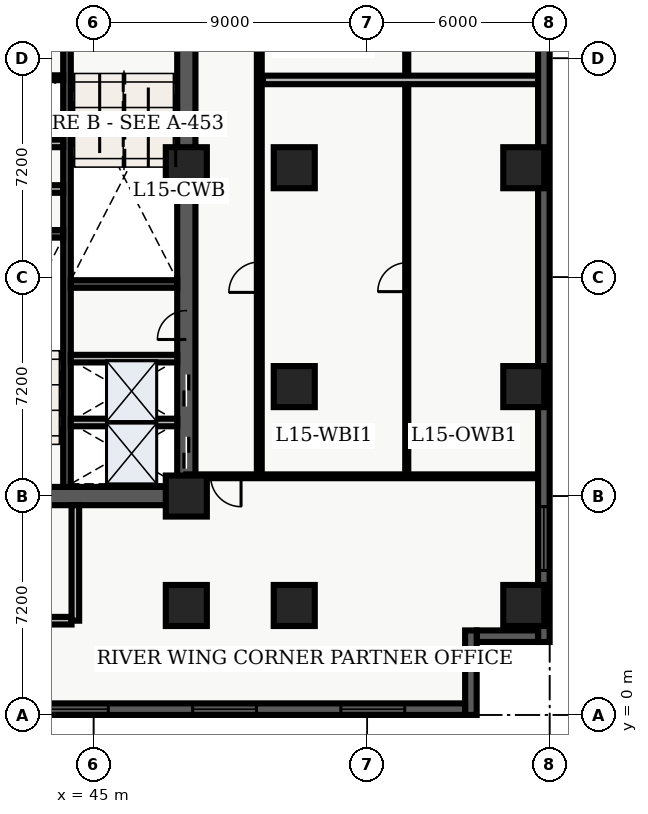
"""IFC4 building model, lengths in metres.
Left out: names, types, materials, properties, quantities, classifications, styles, units other than length and angle.
Written with IfcOpenShell. Run it as: python <this file> out.ifc"""

import sys

from ifc_helpers import new_model, entity, si_unit, converted_unit, direction, frame, origin_with_axes, origin_2d_with_axis, place, context, subcontext, project, spatial, polyline, rectangle, outline, extrude, element, fill, save


model = new_model("IFC4")
c1 = context("Model", 3, precision=1e-05, world=origin_with_axes(), true_north=direction((0.0, 1.0)))
c2 = subcontext(c1, "Body", "Model", "MODEL_VIEW")
j1 = project(units=[si_unit("LENGTHUNIT", "METRE"), converted_unit("PLANEANGLEUNIT", "DEGREE", entity("IfcPlaneAngleMeasure", 0.017), si_unit("PLANEANGLEUNIT", "RADIAN"), dimensions=[0, 0, 0, 0, 0, 0, 0])], contexts=[c1])
p1 = place(None, origin_with_axes())
s1 = spatial("IfcSite", under=j1, at=p1, CompositionType="ELEMENT")
p2 = place(p1, origin_with_axes())
s2 = spatial("IfcBuilding", under=s1, at=p2, CompositionType="ELEMENT")
p3 = place(p2, frame((0.0, 0.0, 63.9), z_axis=(0.0, 0.0, 1.0), x_axis=(1.0, 0.0, 0.0)))
s3 = spatial("IfcBuildingStorey", under=s2, at=p3, CompositionType="ELEMENT", Elevation=63.9)
p4 = place(p3, frame((40.2, 7.2, 0.0), z_axis=(0.0, 0.0, 1.0), x_axis=(1.0, 0.0, 0.0)))
e1 = element("IfcWall", 1, at=p4, inside=s3, PredefinedType="SHEAR", context=c2, shape_type="SweptSolid", body=[
    extrude(outline(polyline([(0.0, -0.3), (7.85, -0.3), (7.85, 0.3), (0.0, 0.3), (0.0, -0.3)])), origin_with_axes(), (0.0, 0.0, 1.0), 3.66),
])
p5 = place(p4, frame((2.175, 0.0, 0.0), z_axis=(0.0, 0.0, 1.0), x_axis=(1.0, 0.0, 0.0)))
e2 = element("IfcOpeningElement", 2, at=p5, cuts=e1, PredefinedType="OPENING", context=c2, shape_type="SweptSolid", body=[
    extrude(rectangle(XDim=1.05, YDim=0.62, at=origin_2d_with_axis()), origin_with_axes(), (0.0, 0.0, 1.0), 2.15),
])
p6 = place(p3, frame((48.05, 7.2, 0.0), z_axis=(0.0, 0.0, 1.0), x_axis=(0.0, 1.0, 0.0)))
e3 = element("IfcWall", 3, at=p6, inside=s3, PredefinedType="SHEAR", context=c2, shape_type="SweptSolid", body=[
    extrude(outline(polyline([(0.0, -0.3), (15.6, -0.3), (15.6, 0.3), (0.0, 0.3), (0.0, -0.3)])), origin_with_axes(), (0.0, 0.0, 1.0), 3.66),
])
p7 = place(p6, frame((1.425, 0.0, 0.0), z_axis=(0.0, 0.0, 1.0), x_axis=(1.0, 0.0, 0.0)))
e4 = element("IfcOpeningElement", 4, at=p7, cuts=e3, PredefinedType="OPENING", context=c2, shape_type="SweptSolid", body=[
    extrude(rectangle(XDim=1.05, YDim=0.62, at=origin_2d_with_axis()), origin_with_axes(), (0.0, 0.0, 1.0), 2.15),
])
p8 = place(p6, frame((3.475, 0.0, 0.0), z_axis=(0.0, 0.0, 1.0), x_axis=(1.0, 0.0, 0.0)))
e5 = element("IfcOpeningElement", 5, at=p8, cuts=e3, PredefinedType="OPENING", context=c2, shape_type="SweptSolid", body=[
    extrude(rectangle(XDim=1.05, YDim=0.62, at=origin_2d_with_axis()), origin_with_axes(), (0.0, 0.0, 1.0), 2.15),
])
p9 = place(p6, frame((5.625, 0.0, 0.0), z_axis=(0.0, 0.0, 1.0), x_axis=(1.0, 0.0, 0.0)))
e6 = element("IfcOpeningElement", 6, at=p9, cuts=e3, PredefinedType="OPENING", context=c2, shape_type="SweptSolid", body=[
    extrude(rectangle(XDim=0.95, YDim=0.62, at=origin_2d_with_axis()), origin_with_axes(), (0.0, 0.0, 1.0), 2.15),
])
p10 = place(p3, frame((44.125, 7.5, 0.0), z_axis=(0.0, 0.0, 1.0), x_axis=(0.0, 1.0, 0.0)))
e7 = element("IfcWall", 7, at=p10, inside=s3, PredefinedType="SHEAR", context=c2, shape_type="SweptSolid", body=[
    extrude(outline(polyline([(0.0, -0.125), (15.0, -0.125), (15.0, 0.125), (0.0, 0.125), (0.0, -0.125)])), origin_with_axes(), (0.0, 0.0, 1.0), 3.66),
])
for number, where, z_axis, x_axis in (
    (8, (40.5, 15.825, 0.0), (0.0, 0.0, 1.0), (1.0, 0.0, 0.0)),
    (9, (44.25, 14.175, 0.0), (0.0, 0.0, 1.0), (1.0, 0.0, 0.0)),
):
    element("IfcWall", number, at=place(p3, frame(where, z_axis=z_axis, x_axis=x_axis)), inside=s3, PredefinedType="SHEAR", context=c2, shape_type="SweptSolid", body=[
        extrude(outline(polyline([(0.0, -0.125), (3.5, -0.125), (3.5, 0.125), (0.0, 0.125), (0.0, -0.125)])), origin_with_axes(), (0.0, 0.0, 1.0), 3.66),
    ])
p11 = place(p3, frame((40.5, 17.3, 0.0), z_axis=(0.0, 0.0, 1.0), x_axis=(1.0, 0.0, 0.0)))
e10 = element("IfcWall", 10, at=p11, inside=s3, PredefinedType="SOLIDWALL", context=c2, shape_type="SweptSolid", body=[
    extrude(outline(polyline([(0.0, -0.125), (3.5, -0.125), (3.5, 0.125), (0.0, 0.125), (0.0, -0.125)])), origin_with_axes(), (0.0, 0.0, 1.0), 2.7),
])
p12 = place(p11, frame((2.4, 0.0, 0.0), z_axis=(0.0, 0.0, 1.0), x_axis=(1.0, 0.0, 0.0)))
e11 = element("IfcOpeningElement", 11, at=p12, cuts=e10, PredefinedType="OPENING", context=c2, shape_type="SweptSolid", body=[
    extrude(rectangle(XDim=0.9, YDim=0.27, at=origin_2d_with_axis()), origin_with_axes(), (0.0, 0.0, 1.0), 2.15),
])
p13 = place(p3, frame((40.5, 18.8, 0.0), z_axis=(0.0, 0.0, 1.0), x_axis=(1.0, 0.0, 0.0)))
e12 = element("IfcWall", 12, at=p13, inside=s3, PredefinedType="SOLIDWALL", context=c2, shape_type="SweptSolid", body=[
    extrude(outline(polyline([(0.0, -0.125), (3.5, -0.125), (3.5, 0.125), (0.0, 0.125), (0.0, -0.125)])), origin_with_axes(), (0.0, 0.0, 1.0), 2.7),
])
p14 = place(p3, frame((40.325, 3.1, 0.0), z_axis=(0.0, 0.0, 1.0), x_axis=(1.0, 0.0, 0.0)))
e13 = element("IfcWall", 13, at=p14, inside=s3, PredefinedType="SOLIDWALL", context=c2, shape_type="SweptSolid", body=[
    extrude(outline(polyline([(0.0, -0.125), (3.95, -0.125), (3.95, 0.125), (0.0, 0.125), (0.0, -0.125)])), origin_with_axes(), (0.0, 0.0, 1.0), 2.7),
])
p15 = place(p3, frame((44.4, 3.1, 0.0), z_axis=(0.0, 0.0, 1.0), x_axis=(0.0, 1.0, 0.0)))
e14 = element("IfcWall", 14, at=p15, inside=s3, PredefinedType="SOLIDWALL", context=c2, shape_type="SweptSolid", body=[
    extrude(outline(polyline([(0.0, -0.125), (3.8, -0.125), (3.8, 0.125), (0.0, 0.125), (0.0, -0.125)])), origin_with_axes(), (0.0, 0.0, 1.0), 2.7),
])
for number, where, z_axis, x_axis in (
    (15, (48.05, 3.6, 0.0), (0.0, 0.0, 1.0), (1.0, 0.0, 0.0)),
    (16, (48.05, 7.2, 0.0), (0.0, 0.0, 1.0), (1.0, 0.0, 0.0)),
    (17, (48.05, 18.0, 0.0), (0.0, 0.0, 1.0), (1.0, 0.0, 0.0)),
    (18, (51.6, 3.6, 0.0), (0.0, 0.0, 1.0), (1.0, 0.0, 0.0)),
    (19, (51.6, 10.8, 0.0), (0.0, 0.0, 1.0), (1.0, 0.0, 0.0)),
    (20, (51.6, 18.0, 0.0), (0.0, 0.0, 1.0), (1.0, 0.0, 0.0)),
    (21, (59.15, 3.6, 0.0), (0.0, 0.0, 1.0), (1.0, 0.0, 0.0)),
    (22, (59.15, 10.8, 0.0), (0.0, 0.0, 1.0), (1.0, 0.0, 0.0)),
    (23, (59.15, 18.0, 0.0), (0.0, 0.0, 1.0), (1.0, 0.0, 0.0)),
):
    element("IfcColumn", number, at=place(p3, frame(where, z_axis=z_axis, x_axis=x_axis)), inside=s3, PredefinedType="COLUMN", context=c2, shape_type="SweptSolid", body=[
        extrude(rectangle(XDim=1.35, YDim=1.35, at=origin_2d_with_axis()), origin_with_axes(), (0.0, 0.0, 1.0), 3.9),
    ])
p16 = place(p3, frame((40.5, 20.96, 0.0), z_axis=(0.0, 0.0, 1.0), x_axis=(1.0, 0.0, 0.0)))
e24 = element("IfcWall", 24, at=p16, inside=s3, PredefinedType="PARTITIONING", context=c2, shape_type="SweptSolid", body=[
    extrude(outline(polyline([(0.0, -0.08), (3.5, -0.08), (3.5, 0.08), (0.0, 0.08), (0.0, -0.08)])), origin_with_axes(), (0.0, 0.0, 1.0), 2.7),
])
for number, where, z_axis, x_axis in (
    (25, (44.25, 9.62, 0.0), (0.0, 0.0, 1.0), (1.0, 0.0, 0.0)),
    (26, (44.25, 11.72, 0.0), (0.0, 0.0, 1.0), (1.0, 0.0, 0.0)),
):
    element("IfcWall", number, at=place(p3, frame(where, z_axis=z_axis, x_axis=x_axis)), inside=s3, PredefinedType="SOLIDWALL", context=c2, shape_type="SweptSolid", body=[
        extrude(outline(polyline([(0.0, -0.125), (3.5, -0.125), (3.5, 0.125), (0.0, 0.125), (0.0, -0.125)])), origin_with_axes(), (0.0, 0.0, 1.0), 2.7),
    ])
p17 = place(p3, frame((50.45, 7.85, 0.0), z_axis=(0.0, 0.0, 1.0), x_axis=(0.0, 1.0, 0.0)))
e27 = element("IfcWall", 27, at=p17, inside=s3, PredefinedType="PARTITIONING", context=c2, shape_type="SweptSolid", body=[
    extrude(outline(polyline([(0.0, -0.08), (18.8, -0.08), (18.8, 0.08), (0.0, 0.08), (0.0, -0.08)])), origin_with_axes(), (0.0, 0.0, 1.0), 2.7),
])
p18 = place(p17, frame((6.549, 0.0, 0.0), z_axis=(0.0, 0.0, 1.0), x_axis=(1.0, 0.0, 0.0)))
e28 = element("IfcOpeningElement", 28, at=p18, cuts=e27, PredefinedType="OPENING", context=c2, shape_type="SweptSolid", body=[
    extrude(rectangle(XDim=1.0, YDim=0.18, at=origin_2d_with_axis()), origin_with_axes(), (0.0, 0.0, 1.0), 2.15),
])
p19 = place(p17, frame((18.039, 0.0, 0.0), z_axis=(0.0, 0.0, 1.0), x_axis=(1.0, 0.0, 0.0)))
e29 = element("IfcOpeningElement", 29, at=p19, cuts=e27, PredefinedType="OPENING", context=c2, shape_type="SweptSolid", body=[
    extrude(rectangle(XDim=1.0, YDim=0.18, at=origin_2d_with_axis()), origin_with_axes(), (0.0, 0.0, 1.0), 2.15),
])
p20 = place(p3, frame((59.64, 7.85, 0.0), z_axis=(0.0, 0.0, 1.0), x_axis=(-1.0, 0.0, 0.0)))
e30 = element("IfcWall", 30, at=p20, inside=s3, PredefinedType="PARTITIONING", context=c2, shape_type="SweptSolid", body=[
    extrude(outline(polyline([(0.0, -0.062), (11.59, -0.062), (11.59, 0.062), (0.0, 0.062), (0.0, -0.062)])), origin_with_axes(), (0.0, 0.0, 1.0), 2.7),
])
p21 = place(p20, frame((10.29, 0.0, 0.0), z_axis=(0.0, 0.0, 1.0), x_axis=(1.0, 0.0, 0.0)))
e31 = element("IfcOpeningElement", 31, at=p21, cuts=e30, PredefinedType="OPENING", context=c2, shape_type="SweptSolid", body=[
    extrude(rectangle(XDim=1.0, YDim=0.145, at=origin_2d_with_axis()), origin_with_axes(), (0.0, 0.0, 1.0), 2.15),
])
p22 = place(p3, frame((55.3, 7.98, 0.0), z_axis=(0.0, 0.0, 1.0), x_axis=(0.0, 1.0, 0.0)))
e32 = element("IfcWall", 32, at=p22, inside=s3, PredefinedType="PARTITIONING", context=c2, shape_type="SweptSolid", body=[
    extrude(outline(polyline([(0.0, -0.05), (18.54, -0.05), (18.54, 0.05), (0.0, 0.05), (0.0, -0.05)])), origin_with_axes(), (0.0, 0.0, 1.0), 2.7),
])
p23 = place(p22, frame((6.419, 0.0, 0.0), z_axis=(0.0, 0.0, 1.0), x_axis=(1.0, 0.0, 0.0)))
e33 = element("IfcOpeningElement", 33, at=p23, cuts=e32, PredefinedType="OPENING", context=c2, shape_type="SweptSolid", body=[
    extrude(rectangle(XDim=0.95, YDim=0.12, at=origin_2d_with_axis()), origin_with_axes(), (0.0, 0.0, 1.0), 2.15),
])
p24 = place(p22, frame((15.759, 0.0, 0.0), z_axis=(0.0, 0.0, 1.0), x_axis=(1.0, 0.0, 0.0)))
e34 = element("IfcOpeningElement", 34, at=p24, cuts=e32, PredefinedType="OPENING", context=c2, shape_type="SweptSolid", body=[
    extrude(rectangle(XDim=0.95, YDim=0.12, at=origin_2d_with_axis()), origin_with_axes(), (0.0, 0.0, 1.0), 2.15),
])
p25 = place(p3, frame((50.57, 20.888, 0.0), z_axis=(0.0, 0.0, 1.0), x_axis=(1.0, 0.0, 0.0)))
e35 = element("IfcWall", 35, at=p25, inside=s3, PredefinedType="PARTITIONING", context=c2, shape_type="SweptSolid", body=[
    extrude(outline(polyline([(0.0, -0.14), (9.055, -0.14), (9.055, 0.14), (0.0, 0.14), (0.0, -0.14)])), origin_with_axes(), (0.0, 0.0, 1.0), 2.7),
])
p26 = place(p3, frame((59.81, 26.02, 0.0), z_axis=(0.0, 0.0, 1.0), x_axis=(0.0, -1.0, 0.0)))
e36 = element("IfcWall", 36, at=p26, inside=s3, PredefinedType="SOLIDWALL", context=c2, shape_type="SweptSolid", body=[
    extrude(outline(polyline([(0.0, -0.19), (23.62, -0.19), (23.62, 0.19), (0.0, 0.19), (0.0, -0.19)])), origin_with_axes(), (0.0, 0.0, 1.0), 3.66),
])
p27 = place(p26, frame((20.218, 0.0, 0.45), z_axis=(0.0, 0.0, 1.0), x_axis=(1.0, 0.0, 0.0)))
e37 = element("IfcOpeningElement", 37, at=p27, cuts=e36, PredefinedType="OPENING", context=c2, shape_type="SweptSolid", body=[
    extrude(rectangle(XDim=2.1, YDim=0.4, at=origin_2d_with_axis()), origin_with_axes(), (0.0, 0.0, 1.0), 2.2),
])
p28 = place(p3, frame((59.62, 2.59, 0.0), z_axis=(0.0, 0.0, 1.0), x_axis=(-1.0, 0.0, 0.0)))
e38 = element("IfcWall", 38, at=p28, inside=s3, PredefinedType="SOLIDWALL", context=c2, shape_type="SweptSolid", body=[
    extrude(outline(polyline([(0.0, -0.19), (2.02, -0.19), (2.02, 0.19), (0.0, 0.19), (0.0, -0.19)])), origin_with_axes(), (0.0, 0.0, 1.0), 3.66),
])
p29 = place(p3, frame((57.41, 2.78, 0.0), z_axis=(0.0, 0.0, 1.0), x_axis=(0.0, -1.0, 0.0)))
e39 = element("IfcWall", 39, at=p29, inside=s3, PredefinedType="SOLIDWALL", context=c2, shape_type="SweptSolid", body=[
    extrude(outline(polyline([(0.0, -0.19), (2.78, -0.19), (2.78, 0.19), (0.0, 0.19), (0.0, -0.19)])), origin_with_axes(), (0.0, 0.0, 1.0), 3.66),
])
p30 = place(p3, frame((57.22, 0.19, 0.0), z_axis=(0.0, 0.0, 1.0), x_axis=(-1.0, 0.0, 0.0)))
e40 = element("IfcWall", 40, at=p30, inside=s3, PredefinedType="SOLIDWALL", context=c2, shape_type="SweptSolid", body=[
    extrude(outline(polyline([(0.0, -0.19), (54.82, -0.19), (54.82, 0.19), (0.0, 0.19), (0.0, -0.19)])), origin_with_axes(), (0.0, 0.0, 1.0), 3.66),
])
p31 = place(p30, frame((3.037, 0.0, 0.45), z_axis=(0.0, 0.0, 1.0), x_axis=(1.0, 0.0, 0.0)))
e41 = element("IfcOpeningElement", 41, at=p31, cuts=e40, PredefinedType="OPENING", context=c2, shape_type="SweptSolid", body=[
    extrude(rectangle(XDim=2.1, YDim=0.4, at=origin_2d_with_axis()), origin_with_axes(), (0.0, 0.0, 1.0), 2.2),
])
p32 = place(p30, frame((7.912, 0.0, 0.45), z_axis=(0.0, 0.0, 1.0), x_axis=(1.0, 0.0, 0.0)))
e42 = element("IfcOpeningElement", 42, at=p32, cuts=e40, PredefinedType="OPENING", context=c2, shape_type="SweptSolid", body=[
    extrude(rectangle(XDim=2.1, YDim=0.4, at=origin_2d_with_axis()), origin_with_axes(), (0.0, 0.0, 1.0), 2.2),
])
p33 = place(p30, frame((12.786, 0.0, 0.45), z_axis=(0.0, 0.0, 1.0), x_axis=(1.0, 0.0, 0.0)))
e43 = element("IfcOpeningElement", 43, at=p33, cuts=e40, PredefinedType="OPENING", context=c2, shape_type="SweptSolid", body=[
    extrude(rectangle(XDim=2.1, YDim=0.4, at=origin_2d_with_axis()), origin_with_axes(), (0.0, 0.0, 1.0), 2.2),
])
p34 = place(p30, frame((17.661, 0.0, 0.45), z_axis=(0.0, 0.0, 1.0), x_axis=(1.0, 0.0, 0.0)))
e44 = element("IfcOpeningElement", 44, at=p34, cuts=e40, PredefinedType="OPENING", context=c2, shape_type="SweptSolid", body=[
    extrude(rectangle(XDim=2.1, YDim=0.4, at=origin_2d_with_axis()), origin_with_axes(), (0.0, 0.0, 1.0), 2.2),
])
p35 = place(p30, frame((22.535, 0.0, 0.45), z_axis=(0.0, 0.0, 1.0), x_axis=(1.0, 0.0, 0.0)))
e45 = element("IfcOpeningElement", 45, at=p35, cuts=e40, PredefinedType="OPENING", context=c2, shape_type="SweptSolid", body=[
    extrude(rectangle(XDim=2.1, YDim=0.4, at=origin_2d_with_axis()), origin_with_axes(), (0.0, 0.0, 1.0), 2.2),
])
p36 = place(p30, frame((27.41, 0.0, 0.45), z_axis=(0.0, 0.0, 1.0), x_axis=(1.0, 0.0, 0.0)))
e46 = element("IfcOpeningElement", 46, at=p36, cuts=e40, PredefinedType="OPENING", context=c2, shape_type="SweptSolid", body=[
    extrude(rectangle(XDim=2.1, YDim=0.4, at=origin_2d_with_axis()), origin_with_axes(), (0.0, 0.0, 1.0), 2.2),
])
p37 = place(p30, frame((32.285, 0.0, 0.45), z_axis=(0.0, 0.0, 1.0), x_axis=(1.0, 0.0, 0.0)))
e47 = element("IfcOpeningElement", 47, at=p37, cuts=e40, PredefinedType="OPENING", context=c2, shape_type="SweptSolid", body=[
    extrude(rectangle(XDim=2.1, YDim=0.4, at=origin_2d_with_axis()), origin_with_axes(), (0.0, 0.0, 1.0), 2.2),
])
p38 = place(p30, frame((37.159, 0.0, 0.45), z_axis=(0.0, 0.0, 1.0), x_axis=(1.0, 0.0, 0.0)))
e48 = element("IfcOpeningElement", 48, at=p38, cuts=e40, PredefinedType="OPENING", context=c2, shape_type="SweptSolid", body=[
    extrude(rectangle(XDim=2.1, YDim=0.4, at=origin_2d_with_axis()), origin_with_axes(), (0.0, 0.0, 1.0), 2.2),
])
p39 = place(p30, frame((47.758, 0.0, 0.45), z_axis=(0.0, 0.0, 1.0), x_axis=(1.0, 0.0, 0.0)))
e49 = element("IfcOpeningElement", 49, at=p39, cuts=e40, PredefinedType="OPENING", context=c2, shape_type="SweptSolid", body=[
    extrude(rectangle(XDim=2.1, YDim=0.4, at=origin_2d_with_axis()), origin_with_axes(), (0.0, 0.0, 1.0), 2.2),
])
p40 = place(p30, frame((52.633, 0.0, 0.45), z_axis=(0.0, 0.0, 1.0), x_axis=(1.0, 0.0, 0.0)))
e50 = element("IfcOpeningElement", 50, at=p40, cuts=e40, PredefinedType="OPENING", context=c2, shape_type="SweptSolid", body=[
    extrude(rectangle(XDim=2.1, YDim=0.4, at=origin_2d_with_axis()), origin_with_axes(), (0.0, 0.0, 1.0), 2.2),
])
p41 = place(p6, frame((1.425, 0.0, 0.0), z_axis=(0.0, 0.0, 1.0), x_axis=(1.0, 0.0, 0.0)))
e51 = element("IfcDoor", 51, at=p41, inside=s3, OperationType="SLIDING_TO_LEFT", PredefinedType="DOOR", context=c2, shape_type="SweptSolid", body=[
    extrude(rectangle(XDim=1.05, YDim=0.09, at=origin_2d_with_axis()), origin_with_axes(), (0.0, 0.0, 1.0), 2.15),
])
fill(e4, e51)
p42 = place(p6, frame((3.475, 0.0, 0.0), z_axis=(0.0, 0.0, 1.0), x_axis=(1.0, 0.0, 0.0)))
e52 = element("IfcDoor", 52, at=p42, inside=s3, OperationType="SLIDING_TO_RIGHT", PredefinedType="DOOR", context=c2, shape_type="SweptSolid", body=[
    extrude(rectangle(XDim=1.05, YDim=0.09, at=origin_2d_with_axis()), origin_with_axes(), (0.0, 0.0, 1.0), 2.15),
])
fill(e5, e52)
p43 = place(p6, frame((5.625, 0.0, 0.0), z_axis=(0.0, 0.0, 1.0), x_axis=(1.0, 0.0, 0.0)))
e53 = element("IfcDoor", 53, at=p43, inside=s3, OperationType="SINGLE_SWING_LEFT", PredefinedType="DOOR", context=c2, shape_type="SweptSolid", body=[
    extrude(rectangle(XDim=0.95, YDim=0.09, at=origin_2d_with_axis()), origin_with_axes(), (0.0, 0.0, 1.0), 2.15),
])
fill(e6, e53)
p44 = place(p20, frame((10.29, 0.0, 0.0), z_axis=(0.0, 0.0, 1.0), x_axis=(1.0, 0.0, 0.0)))
e54 = element("IfcDoor", 54, at=p44, inside=s3, OperationType="SINGLE_SWING_LEFT", PredefinedType="DOOR", context=c2, shape_type="SweptSolid", body=[
    extrude(rectangle(XDim=1.0, YDim=0.075, at=origin_2d_with_axis()), origin_with_axes(), (0.0, 0.0, 1.0), 2.15),
])
fill(e31, e54)
p45 = place(p22, frame((6.419, 0.0, 0.0), z_axis=(0.0, 0.0, 1.0), x_axis=(1.0, 0.0, 0.0)))
e55 = element("IfcDoor", 55, at=p45, inside=s3, OperationType="SINGLE_SWING_LEFT", PredefinedType="DOOR", context=c2, shape_type="SweptSolid", body=[
    extrude(rectangle(XDim=0.95, YDim=0.06, at=origin_2d_with_axis()), origin_with_axes(), (0.0, 0.0, 1.0), 2.15),
])
fill(e33, e55)
p46 = place(p17, frame((6.549, 0.0, 0.0), z_axis=(0.0, 0.0, 1.0), x_axis=(1.0, 0.0, 0.0)))
e56 = element("IfcDoor", 56, at=p46, inside=s3, OperationType="SINGLE_SWING_LEFT", PredefinedType="DOOR", context=c2, shape_type="SweptSolid", body=[
    extrude(rectangle(XDim=1.0, YDim=0.09, at=origin_2d_with_axis()), origin_with_axes(), (0.0, 0.0, 1.0), 2.15),
])
fill(e28, e56)
p47 = place(p26, frame((20.218, 0.0, 0.45), z_axis=(0.0, 0.0, 1.0), x_axis=(1.0, 0.0, 0.0)))
e57 = element("IfcWindow", 57, at=p47, inside=s3, PredefinedType="WINDOW", context=c2, shape_type="SweptSolid", body=[
    extrude(rectangle(XDim=2.1, YDim=0.09, at=origin_2d_with_axis()), origin_with_axes(), (0.0, 0.0, 1.0), 2.2),
])
fill(e37, e57)
p48 = place(p30, frame((3.037, 0.0, 0.45), z_axis=(0.0, 0.0, 1.0), x_axis=(1.0, 0.0, 0.0)))
e58 = element("IfcWindow", 58, at=p48, inside=s3, PredefinedType="WINDOW", context=c2, shape_type="SweptSolid", body=[
    extrude(rectangle(XDim=2.1, YDim=0.09, at=origin_2d_with_axis()), origin_with_axes(), (0.0, 0.0, 1.0), 2.2),
])
fill(e41, e58)
p49 = place(p30, frame((7.912, 0.0, 0.45), z_axis=(0.0, 0.0, 1.0), x_axis=(1.0, 0.0, 0.0)))
e59 = element("IfcWindow", 59, at=p49, inside=s3, PredefinedType="WINDOW", context=c2, shape_type="SweptSolid", body=[
    extrude(rectangle(XDim=2.1, YDim=0.09, at=origin_2d_with_axis()), origin_with_axes(), (0.0, 0.0, 1.0), 2.2),
])
fill(e42, e59)
p50 = place(p30, frame((12.786, 0.0, 0.45), z_axis=(0.0, 0.0, 1.0), x_axis=(1.0, 0.0, 0.0)))
e60 = element("IfcWindow", 60, at=p50, inside=s3, PredefinedType="WINDOW", context=c2, shape_type="SweptSolid", body=[
    extrude(rectangle(XDim=2.1, YDim=0.09, at=origin_2d_with_axis()), origin_with_axes(), (0.0, 0.0, 1.0), 2.2),
])
fill(e43, e60)
save(model, sys.argv[1])
